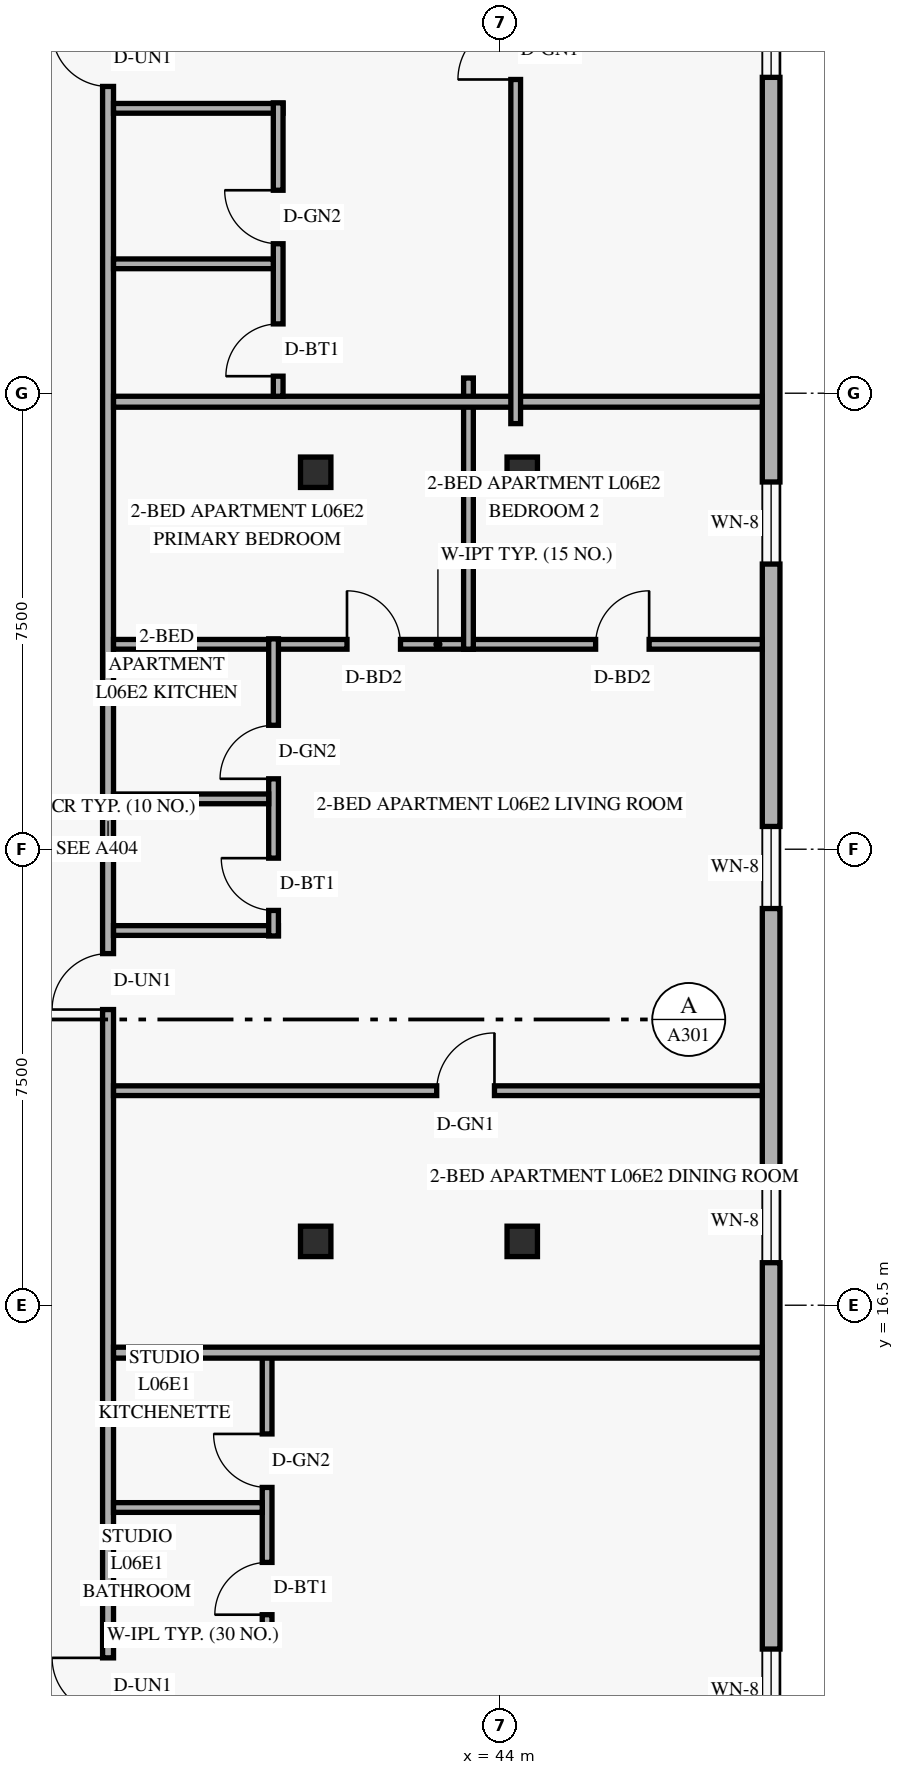
"""IFC4 building model, lengths in metres.
Left out: names, types, materials, properties, quantities, classifications, styles, units other than length and angle.
Written with IfcOpenShell. Run it as: python <this file> out.ifc"""

import sys

from ifc_helpers import new_model, si_unit, direction, frame, frame_2d, origin, origin_2d, place, context, subcontext, project, spatial, rectangle, hollow_rectangle, extrude, element, fill, save


model = new_model("IFC4")
c1 = context("Model", 3, precision=1e-05, world=origin(), true_north=direction((0.0, 1.0)))
c2 = subcontext(c1, "Body", "Model", "MODEL_VIEW")
j1 = project(units=[si_unit("LENGTHUNIT", "METRE"), si_unit("PLANEANGLEUNIT", "RADIAN")], contexts=[c1])
p1 = place(None, origin())
s1 = spatial("IfcSite", under=j1, at=p1, CompositionType="ELEMENT")
p2 = place(p1, origin())
s2 = spatial("IfcBuilding", under=s1, at=p2, CompositionType="ELEMENT")
p3 = place(p2, frame((0.0, 0.0, 27.6)))
s3 = spatial("IfcBuildingStorey", under=s2, at=p3, CompositionType="ELEMENT", Elevation=27.6)
for number, where, z_axis, x_axis in (
    (1, (40.902, 17.55, 0.0), (0.035, 0.0, 0.999), (0.0, 1.0, 0.0)),
    (2, (40.902, 30.2, 0.0), (0.035, 0.0, 0.999), (0.0, 1.0, 0.0)),
):
    element("IfcColumn", number, at=place(p3, frame(where, z_axis=z_axis, x_axis=x_axis)), inside=s3, PredefinedType="COLUMN", context=c2, shape_type="SweptSolid", body=[
        extrude(hollow_rectangle(XDim=0.5, YDim=0.5, WallThickness=0.022, at=origin_2d()), origin(), (0.0, 0.0, 1.0), 3.602),
    ])
for number, where, z_axis, x_axis in (
    (3, (44.258, 17.55, 0.0), (0.058, 0.0, 0.998), (0.0, 1.0, 0.0)),
    (4, (44.258, 30.2, 0.0), (0.058, 0.0, 0.998), (0.0, 1.0, 0.0)),
):
    element("IfcColumn", number, at=place(p3, frame(where, z_axis=z_axis, x_axis=x_axis)), inside=s3, PredefinedType="COLUMN", context=c2, shape_type="SweptSolid", body=[
        extrude(hollow_rectangle(XDim=0.5, YDim=0.5, WallThickness=0.022, at=origin_2d()), origin(), (0.0, 0.0, 1.0), 3.606),
    ])
p4 = place(p3, frame((48.455, 4.62, 0.0), z_axis=(0.0, 0.0, 1.0), x_axis=(0.0, 1.0, 0.0)))
e5 = element("IfcWall", 5, at=p4, inside=s3, PredefinedType="SOLIDWALL", context=c2, shape_type="SweptSolid", body=[
    extrude(rectangle(XDim=38.76, YDim=0.29, at=frame_2d((19.38, 0.0))), origin(), (0.0, 0.0, 1.0), 3.36),
])
p5 = place(p4, frame((4.875, 0.0, 0.85)))
e6 = element("IfcOpeningElement", 6, at=p5, cuts=e5, PredefinedType="OPENING", context=c2, shape_type="SweptSolid", body=[
    extrude(rectangle(XDim=1.35, YDim=1.55, at=frame_2d((0.675, 0.775))), frame((0.0, 0.155, 0.0), z_axis=(0.0, -1.0, 0.0), x_axis=(1.0, 0.0, 0.0)), (0.0, 0.0, 1.0), 0.31),
])
p6 = place(p4, frame((12.579, 0.0, 0.85)))
e7 = element("IfcOpeningElement", 7, at=p6, cuts=e5, PredefinedType="OPENING", context=c2, shape_type="SweptSolid", body=[
    extrude(rectangle(XDim=1.35, YDim=1.55, at=frame_2d((0.675, 0.775))), frame((0.0, 0.155, 0.0), z_axis=(0.0, -1.0, 0.0), x_axis=(1.0, 0.0, 0.0)), (0.0, 0.0, 1.0), 0.31),
])
p7 = place(p4, frame((18.404, 0.0, 0.85)))
e8 = element("IfcOpeningElement", 8, at=p7, cuts=e5, PredefinedType="OPENING", context=c2, shape_type="SweptSolid", body=[
    extrude(rectangle(XDim=1.35, YDim=1.55, at=frame_2d((0.675, 0.775))), frame((0.0, 0.155, 0.0), z_axis=(0.0, -1.0, 0.0), x_axis=(1.0, 0.0, 0.0)), (0.0, 0.0, 1.0), 0.31),
])
p8 = place(p4, frame((24.07, 0.0, 0.85)))
e9 = element("IfcOpeningElement", 9, at=p8, cuts=e5, PredefinedType="OPENING", context=c2, shape_type="SweptSolid", body=[
    extrude(rectangle(XDim=1.35, YDim=1.55, at=frame_2d((0.675, 0.775))), frame((0.0, 0.155, 0.0), z_axis=(0.0, -1.0, 0.0), x_axis=(1.0, 0.0, 0.0)), (0.0, 0.0, 1.0), 0.31),
])
p9 = place(p4, frame((32.075, 0.0, 0.85)))
e10 = element("IfcOpeningElement", 10, at=p9, cuts=e5, PredefinedType="OPENING", context=c2, shape_type="SweptSolid", body=[
    extrude(rectangle(XDim=1.35, YDim=1.55, at=frame_2d((0.675, 0.775))), frame((0.0, 0.155, 0.0), z_axis=(0.0, -1.0, 0.0), x_axis=(1.0, 0.0, 0.0)), (0.0, 0.0, 1.0), 0.31),
])
p10 = place(p3, frame((37.55, 1.29, 0.0), z_axis=(0.0, 0.0, 1.0), x_axis=(0.0, 1.0, 0.0)))
e11 = element("IfcWall", 11, at=p10, inside=s3, PredefinedType="STANDARD", context=c2, shape_type="SweptSolid", body=[
    extrude(rectangle(XDim=45.42, YDim=0.18, at=frame_2d((22.71, 0.0))), origin(), (0.0, 0.0, 1.0), 2.649),
])
p11 = place(p10, frame((8.49, 0.0, 0.0)))
e12 = element("IfcOpeningElement", 12, at=p11, cuts=e11, PredefinedType="OPENING", context=c2, shape_type="SweptSolid", body=[
    extrude(rectangle(XDim=0.92, YDim=2.15, at=frame_2d((0.46, 1.075))), frame((0.0, 0.1, 0.0), z_axis=(0.0, -1.0, 0.0), x_axis=(1.0, 0.0, 0.0)), (0.0, 0.0, 1.0), 0.2),
])
p12 = place(p10, frame((20.073, 0.0, 0.0)))
e13 = element("IfcOpeningElement", 13, at=p12, cuts=e11, PredefinedType="OPENING", context=c2, shape_type="SweptSolid", body=[
    extrude(rectangle(XDim=0.92, YDim=2.15, at=frame_2d((0.46, 1.075))), frame((0.0, 0.1, 0.0), z_axis=(0.0, -1.0, 0.0), x_axis=(1.0, 0.0, 0.0)), (0.0, 0.0, 1.0), 0.2),
])
p13 = place(p10, frame((35.256, 0.0, 0.0)))
e14 = element("IfcOpeningElement", 14, at=p13, cuts=e11, PredefinedType="OPENING", context=c2, shape_type="SweptSolid", body=[
    extrude(rectangle(XDim=0.92, YDim=2.15, at=frame_2d((0.46, 1.075))), frame((0.0, 0.1, 0.0), z_axis=(0.0, -1.0, 0.0), x_axis=(1.0, 0.0, 0.0)), (0.0, 0.0, 1.0), 0.2),
])
p14 = place(p3, frame((37.64, 11.08, 0.0), z_axis=(0.0, 0.0, 1.0), x_axis=(1.0, 0.0, 0.0)))
e15 = element("IfcWall", 15, at=p14, inside=s3, PredefinedType="PLUMBINGWALL", context=c2, shape_type="SweptSolid", body=[
    extrude(rectangle(XDim=2.606, YDim=0.16, at=frame_2d((1.303, 0.0))), origin(), (0.0, 0.0, 1.0), 3.36),
])
p15 = place(p3, frame((40.166, 10.99, 0.0), z_axis=(0.0, 0.0, 1.0), x_axis=(0.0, 1.0, 0.0)))
e16 = element("IfcWall", 16, at=p15, inside=s3, PredefinedType="PLUMBINGWALL", context=c2, shape_type="SweptSolid", body=[
    extrude(rectangle(XDim=4.73, YDim=0.16, at=frame_2d((2.365, 0.0))), origin(), (0.0, 0.0, 1.0), 2.932),
])
p16 = place(p15, frame((0.42, 0.0, 0.0)))
e17 = element("IfcOpeningElement", 17, at=p16, cuts=e16, PredefinedType="OPENING", context=c2, shape_type="SweptSolid", body=[
    extrude(rectangle(XDim=0.86, YDim=2.12, at=frame_2d((0.43, 1.06))), frame((0.0, 0.09, 0.0), z_axis=(0.0, -1.0, 0.0), x_axis=(1.0, 0.0, 0.0)), (0.0, 0.0, 1.0), 0.18),
])
p17 = place(p15, frame((2.513, 0.0, 0.0)))
e18 = element("IfcOpeningElement", 18, at=p17, cuts=e16, PredefinedType="OPENING", context=c2, shape_type="SweptSolid", body=[
    extrude(rectangle(XDim=0.88, YDim=2.12, at=frame_2d((0.44, 1.06))), frame((0.0, 0.09, 0.0), z_axis=(0.0, -1.0, 0.0), x_axis=(1.0, 0.0, 0.0)), (0.0, 0.0, 1.0), 0.18),
])
p18 = place(p3, frame((37.64, 13.173, 0.0), z_axis=(0.0, 0.0, 1.0), x_axis=(1.0, 0.0, 0.0)))
e19 = element("IfcWall", 19, at=p18, inside=s3, PredefinedType="PLUMBINGWALL", context=c2, shape_type="SweptSolid", body=[
    extrude(rectangle(XDim=2.446, YDim=0.16, at=frame_2d((1.223, 0.0))), origin(), (0.0, 0.0, 1.0), 3.36),
])
p19 = place(p3, frame((37.64, 15.72, 0.0), z_axis=(0.0, 0.0, 1.0), x_axis=(1.0, 0.0, 0.0)))
e20 = element("IfcWall", 20, at=p19, inside=s3, PredefinedType="PARTITIONING", context=c2, shape_type="SweptSolid", body=[
    extrude(rectangle(XDim=10.67, YDim=0.18, at=frame_2d((5.335, 0.0))), origin(), (0.0, 0.0, 1.0), 2.649),
])
p20 = place(p3, frame((37.64, 27.37, 0.0), z_axis=(0.0, 0.0, 1.0), x_axis=(1.0, 0.0, 0.0)))
e21 = element("IfcWall", 21, at=p20, inside=s3, PredefinedType="PARTITIONING", context=c2, shape_type="SweptSolid", body=[
    extrude(rectangle(XDim=10.67, YDim=0.16, at=frame_2d((5.335, 0.0))), origin(), (0.0, 0.0, 1.0), 2.649),
])
p21 = place(p20, frame((3.84, 0.0, 0.0)))
e22 = element("IfcOpeningElement", 22, at=p21, cuts=e21, PredefinedType="OPENING", context=c2, shape_type="SweptSolid", body=[
    extrude(rectangle(XDim=0.88, YDim=2.14, at=frame_2d((0.44, 1.07))), frame((0.0, 0.09, 0.0), z_axis=(0.0, -1.0, 0.0), x_axis=(1.0, 0.0, 0.0)), (0.0, 0.0, 1.0), 0.18),
])
p22 = place(p20, frame((7.929, 0.0, 0.0)))
e23 = element("IfcOpeningElement", 23, at=p22, cuts=e21, PredefinedType="OPENING", context=c2, shape_type="SweptSolid", body=[
    extrude(rectangle(XDim=0.88, YDim=2.14, at=frame_2d((0.44, 1.07))), frame((0.0, 0.09, 0.0), z_axis=(0.0, -1.0, 0.0), x_axis=(1.0, 0.0, 0.0)), (0.0, 0.0, 1.0), 0.18),
])
p23 = place(p3, frame((37.64, 22.663, 0.0), z_axis=(0.0, 0.0, 1.0), x_axis=(1.0, 0.0, 0.0)))
e24 = element("IfcWall", 24, at=p23, inside=s3, PredefinedType="PLUMBINGWALL", context=c2, shape_type="SweptSolid", body=[
    extrude(rectangle(XDim=2.712, YDim=0.16, at=frame_2d((1.356, 0.0))), origin(), (0.0, 0.0, 1.0), 3.36),
])
p24 = place(p3, frame((40.272, 22.573, 0.0), z_axis=(0.0, 0.0, 1.0), x_axis=(0.0, 1.0, 0.0)))
e25 = element("IfcWall", 25, at=p24, inside=s3, PredefinedType="PLUMBINGWALL", context=c2, shape_type="SweptSolid", body=[
    extrude(rectangle(XDim=4.887, YDim=0.16, at=frame_2d((2.443, 0.0))), origin(), (0.0, 0.0, 1.0), 2.932),
])
p25 = place(p24, frame((0.42, 0.0, 0.0)))
e26 = element("IfcOpeningElement", 26, at=p25, cuts=e25, PredefinedType="OPENING", context=c2, shape_type="SweptSolid", body=[
    extrude(rectangle(XDim=0.86, YDim=2.12, at=frame_2d((0.43, 1.06))), frame((0.0, 0.09, 0.0), z_axis=(0.0, -1.0, 0.0), x_axis=(1.0, 0.0, 0.0)), (0.0, 0.0, 1.0), 0.18),
])
p26 = place(p24, frame((2.585, 0.0, 0.0)))
e27 = element("IfcOpeningElement", 27, at=p26, cuts=e25, PredefinedType="OPENING", context=c2, shape_type="SweptSolid", body=[
    extrude(rectangle(XDim=0.88, YDim=2.12, at=frame_2d((0.44, 1.06))), frame((0.0, 0.09, 0.0), z_axis=(0.0, -1.0, 0.0), x_axis=(1.0, 0.0, 0.0)), (0.0, 0.0, 1.0), 0.18),
])
p27 = place(p3, frame((37.64, 24.828, 0.0), z_axis=(0.0, 0.0, 1.0), x_axis=(1.0, 0.0, 0.0)))
e28 = element("IfcWall", 28, at=p27, inside=s3, PredefinedType="PLUMBINGWALL", context=c2, shape_type="SweptSolid", body=[
    extrude(rectangle(XDim=2.552, YDim=0.16, at=frame_2d((1.276, 0.0))), origin(), (0.0, 0.0, 1.0), 3.36),
])
p28 = place(p3, frame((37.64, 20.029, 0.0), z_axis=(0.0, 0.0, 1.0), x_axis=(1.0, 0.0, 0.0)))
e29 = element("IfcWall", 29, at=p28, inside=s3, PredefinedType="PARTITIONING", context=c2, shape_type="SweptSolid", body=[
    extrude(rectangle(XDim=10.67, YDim=0.16, at=frame_2d((5.335, 0.0))), origin(), (0.0, 0.0, 1.0), 2.649),
])
p29 = place(p28, frame((5.315, 0.0, 0.0)))
e30 = element("IfcOpeningElement", 30, at=p29, cuts=e29, PredefinedType="OPENING", context=c2, shape_type="SweptSolid", body=[
    extrude(rectangle(XDim=0.95, YDim=2.15, at=frame_2d((0.475, 1.075))), frame((0.0, 0.09, 0.0), z_axis=(0.0, -1.0, 0.0), x_axis=(1.0, 0.0, 0.0)), (0.0, 0.0, 1.0), 0.18),
])
p30 = place(p3, frame((43.477, 27.29, 0.0), z_axis=(0.0, 0.0, 1.0), x_axis=(0.0, 1.0, 0.0)))
e31 = element("IfcWall", 31, at=p30, inside=s3, PredefinedType="PARTITIONING", context=c2, shape_type="SweptSolid", body=[
    extrude(rectangle(XDim=4.46, YDim=0.16, at=frame_2d((2.23, 0.0))), origin(), (0.0, 0.0, 1.0), 2.649),
])
p31 = place(p3, frame((37.64, 31.36, 0.0), z_axis=(0.0, 0.0, 1.0), x_axis=(1.0, 0.0, 0.0)))
e32 = element("IfcWall", 32, at=p31, inside=s3, PredefinedType="PARTITIONING", context=c2, shape_type="SweptSolid", body=[
    extrude(rectangle(XDim=10.67, YDim=0.18, at=frame_2d((5.335, 0.0))), origin(), (0.0, 0.0, 1.0), 2.649),
])
p32 = place(p3, frame((37.64, 36.186, 0.0), z_axis=(0.0, 0.0, 1.0), x_axis=(1.0, 0.0, 0.0)))
e33 = element("IfcWall", 33, at=p32, inside=s3, PredefinedType="PLUMBINGWALL", context=c2, shape_type="SweptSolid", body=[
    extrude(rectangle(XDim=2.788, YDim=0.16, at=frame_2d((1.394, 0.0))), origin(), (0.0, 0.0, 1.0), 3.36),
])
p33 = place(p3, frame((40.348, 31.45, 0.0), z_axis=(0.0, 0.0, 1.0), x_axis=(0.0, 1.0, 0.0)))
e34 = element("IfcWall", 34, at=p33, inside=s3, PredefinedType="PLUMBINGWALL", context=c2, shape_type="SweptSolid", body=[
    extrude(rectangle(XDim=4.825, YDim=0.16, at=frame_2d((2.413, 0.0))), origin(), (0.0, 0.0, 1.0), 2.932),
])
p34 = place(p33, frame((0.33, 0.0, 0.0)))
e35 = element("IfcOpeningElement", 35, at=p34, cuts=e34, PredefinedType="OPENING", context=c2, shape_type="SweptSolid", body=[
    extrude(rectangle(XDim=0.86, YDim=2.12, at=frame_2d((0.43, 1.06))), frame((0.0, 0.09, 0.0), z_axis=(0.0, -1.0, 0.0), x_axis=(1.0, 0.0, 0.0)), (0.0, 0.0, 1.0), 0.18),
])
p35 = place(p33, frame((2.508, 0.0, 0.0)))
e36 = element("IfcOpeningElement", 36, at=p35, cuts=e34, PredefinedType="OPENING", context=c2, shape_type="SweptSolid", body=[
    extrude(rectangle(XDim=0.88, YDim=2.12, at=frame_2d((0.44, 1.06))), frame((0.0, 0.09, 0.0), z_axis=(0.0, -1.0, 0.0), x_axis=(1.0, 0.0, 0.0)), (0.0, 0.0, 1.0), 0.18),
])
p36 = place(p3, frame((37.64, 33.628, 0.0), z_axis=(0.0, 0.0, 1.0), x_axis=(1.0, 0.0, 0.0)))
e37 = element("IfcWall", 37, at=p36, inside=s3, PredefinedType="PLUMBINGWALL", context=c2, shape_type="SweptSolid", body=[
    extrude(rectangle(XDim=2.628, YDim=0.16, at=frame_2d((1.314, 0.0))), origin(), (0.0, 0.0, 1.0), 3.36),
])
p37 = place(p3, frame((44.254, 31.0, 0.0), z_axis=(0.0, 0.0, 1.0), x_axis=(0.0, 1.0, 0.0)))
e38 = element("IfcWall", 38, at=p37, inside=s3, PredefinedType="PARTITIONING", context=c2, shape_type="SweptSolid", body=[
    extrude(rectangle(XDim=12.84, YDim=0.16, at=frame_2d((6.42, 0.0))), origin(), (0.0, 0.0, 1.0), 2.649),
])
p38 = place(p37, frame((5.66, 0.0, 0.0)))
e39 = element("IfcOpeningElement", 39, at=p38, cuts=e38, PredefinedType="OPENING", context=c2, shape_type="SweptSolid", body=[
    extrude(rectangle(XDim=0.95, YDim=2.15, at=frame_2d((0.475, 1.075))), frame((0.0, 0.09, 0.0), z_axis=(0.0, -1.0, 0.0), x_axis=(1.0, 0.0, 0.0)), (0.0, 0.0, 1.0), 0.18),
])
p39 = place(p5, origin())
e40 = element("IfcWindow", 40, at=p39, inside=s3, PartitioningType="SINGLE_PANEL", PredefinedType="WINDOW", context=c2, shape_type="SweptSolid", body=[
    extrude(rectangle(XDim=1.35, YDim=1.55, at=frame_2d((0.675, 0.775))), frame((0.0, 0.03, 0.0), z_axis=(0.0, -1.0, 0.0), x_axis=(1.0, 0.0, 0.0)), (0.0, 0.0, 1.0), 0.06),
])
fill(e6, e40)
p40 = place(p6, origin())
e41 = element("IfcWindow", 41, at=p40, inside=s3, PartitioningType="SINGLE_PANEL", PredefinedType="WINDOW", context=c2, shape_type="SweptSolid", body=[
    extrude(rectangle(XDim=1.35, YDim=1.55, at=frame_2d((0.675, 0.775))), frame((0.0, 0.03, 0.0), z_axis=(0.0, -1.0, 0.0), x_axis=(1.0, 0.0, 0.0)), (0.0, 0.0, 1.0), 0.06),
])
fill(e7, e41)
p41 = place(p7, origin())
e42 = element("IfcWindow", 42, at=p41, inside=s3, PartitioningType="SINGLE_PANEL", PredefinedType="WINDOW", context=c2, shape_type="SweptSolid", body=[
    extrude(rectangle(XDim=1.35, YDim=1.55, at=frame_2d((0.675, 0.775))), frame((0.0, 0.03, 0.0), z_axis=(0.0, -1.0, 0.0), x_axis=(1.0, 0.0, 0.0)), (0.0, 0.0, 1.0), 0.06),
])
fill(e8, e42)
p42 = place(p8, origin())
e43 = element("IfcWindow", 43, at=p42, inside=s3, PartitioningType="SINGLE_PANEL", PredefinedType="WINDOW", context=c2, shape_type="SweptSolid", body=[
    extrude(rectangle(XDim=1.35, YDim=1.55, at=frame_2d((0.675, 0.775))), frame((0.0, 0.03, 0.0), z_axis=(0.0, -1.0, 0.0), x_axis=(1.0, 0.0, 0.0)), (0.0, 0.0, 1.0), 0.06),
])
fill(e9, e43)
p43 = place(p9, origin())
e44 = element("IfcWindow", 44, at=p43, inside=s3, PartitioningType="SINGLE_PANEL", PredefinedType="WINDOW", context=c2, shape_type="SweptSolid", body=[
    extrude(rectangle(XDim=1.35, YDim=1.55, at=frame_2d((0.675, 0.775))), frame((0.0, 0.03, 0.0), z_axis=(0.0, -1.0, 0.0), x_axis=(1.0, 0.0, 0.0)), (0.0, 0.0, 1.0), 0.06),
])
fill(e10, e44)
p44 = place(p11, origin())
e45 = element("IfcDoor", 45, at=p44, inside=s3, OperationType="SINGLE_SWING_RIGHT", PredefinedType="DOOR", context=c2, shape_type="SweptSolid", body=[
    extrude(rectangle(XDim=0.92, YDim=2.15, at=frame_2d((0.46, 1.075))), frame((0.0, 0.025, 0.0), z_axis=(0.0, -1.0, 0.0), x_axis=(1.0, 0.0, 0.0)), (0.0, 0.0, 1.0), 0.05),
])
fill(e12, e45)
p45 = place(p16, origin())
e46 = element("IfcDoor", 46, at=p45, inside=s3, OperationType="SINGLE_SWING_LEFT", PredefinedType="DOOR", context=c2, shape_type="SweptSolid", body=[
    extrude(rectangle(XDim=0.86, YDim=2.12, at=frame_2d((0.43, 1.06))), frame((0.0, 0.025, 0.0), z_axis=(0.0, -1.0, 0.0), x_axis=(1.0, 0.0, 0.0)), (0.0, 0.0, 1.0), 0.05),
])
fill(e17, e46)
p46 = place(p17, origin())
e47 = element("IfcDoor", 47, at=p46, inside=s3, OperationType="SINGLE_SWING_RIGHT", PredefinedType="DOOR", context=c2, shape_type="SweptSolid", body=[
    extrude(rectangle(XDim=0.88, YDim=2.12, at=frame_2d((0.44, 1.06))), frame((0.0, 0.025, 0.0), z_axis=(0.0, -1.0, 0.0), x_axis=(1.0, 0.0, 0.0)), (0.0, 0.0, 1.0), 0.05),
])
fill(e18, e47)
p47 = place(p29, origin())
e48 = element("IfcDoor", 48, at=p47, inside=s3, OperationType="SINGLE_SWING_RIGHT", PredefinedType="DOOR", context=c2, shape_type="SweptSolid", body=[
    extrude(rectangle(XDim=0.95, YDim=2.15, at=frame_2d((0.475, 1.075))), frame((0.0, 0.025, 0.0), z_axis=(0.0, -1.0, 0.0), x_axis=(1.0, 0.0, 0.0)), (0.0, 0.0, 1.0), 0.05),
])
fill(e30, e48)
p48 = place(p12, origin())
e49 = element("IfcDoor", 49, at=p48, inside=s3, OperationType="SINGLE_SWING_LEFT", PredefinedType="DOOR", context=c2, shape_type="SweptSolid", body=[
    extrude(rectangle(XDim=0.92, YDim=2.15, at=frame_2d((0.46, 1.075))), frame((0.0, 0.025, 0.0), z_axis=(0.0, -1.0, 0.0), x_axis=(1.0, 0.0, 0.0)), (0.0, 0.0, 1.0), 0.05),
])
fill(e13, e49)
p49 = place(p25, origin())
e50 = element("IfcDoor", 50, at=p49, inside=s3, OperationType="SINGLE_SWING_RIGHT", PredefinedType="DOOR", context=c2, shape_type="SweptSolid", body=[
    extrude(rectangle(XDim=0.86, YDim=2.12, at=frame_2d((0.43, 1.06))), frame((0.0, 0.025, 0.0), z_axis=(0.0, -1.0, 0.0), x_axis=(1.0, 0.0, 0.0)), (0.0, 0.0, 1.0), 0.05),
])
fill(e26, e50)
p50 = place(p26, origin())
e51 = element("IfcDoor", 51, at=p50, inside=s3, OperationType="SINGLE_SWING_LEFT", PredefinedType="DOOR", context=c2, shape_type="SweptSolid", body=[
    extrude(rectangle(XDim=0.88, YDim=2.12, at=frame_2d((0.44, 1.06))), frame((0.0, 0.025, 0.0), z_axis=(0.0, -1.0, 0.0), x_axis=(1.0, 0.0, 0.0)), (0.0, 0.0, 1.0), 0.05),
])
fill(e27, e51)
p51 = place(p21, origin())
e52 = element("IfcDoor", 52, at=p51, inside=s3, OperationType="SINGLE_SWING_LEFT", PredefinedType="DOOR", context=c2, shape_type="SweptSolid", body=[
    extrude(rectangle(XDim=0.88, YDim=2.14, at=frame_2d((0.44, 1.07))), frame((0.0, 0.025, 0.0), z_axis=(0.0, -1.0, 0.0), x_axis=(1.0, 0.0, 0.0)), (0.0, 0.0, 1.0), 0.05),
])
fill(e22, e52)
p52 = place(p22, origin())
e53 = element("IfcDoor", 53, at=p52, inside=s3, OperationType="SINGLE_SWING_RIGHT", PredefinedType="DOOR", context=c2, shape_type="SweptSolid", body=[
    extrude(rectangle(XDim=0.88, YDim=2.14, at=frame_2d((0.44, 1.07))), frame((0.0, 0.025, 0.0), z_axis=(0.0, -1.0, 0.0), x_axis=(1.0, 0.0, 0.0)), (0.0, 0.0, 1.0), 0.05),
])
fill(e23, e53)
p53 = place(p38, origin())
e54 = element("IfcDoor", 54, at=p53, inside=s3, OperationType="SINGLE_SWING_LEFT", PredefinedType="DOOR", context=c2, shape_type="SweptSolid", body=[
    extrude(rectangle(XDim=0.95, YDim=2.15, at=frame_2d((0.475, 1.075))), frame((0.0, 0.025, 0.0), z_axis=(0.0, -1.0, 0.0), x_axis=(1.0, 0.0, 0.0)), (0.0, 0.0, 1.0), 0.05),
])
fill(e39, e54)
p54 = place(p13, origin())
e55 = element("IfcDoor", 55, at=p54, inside=s3, OperationType="SINGLE_SWING_RIGHT", PredefinedType="DOOR", context=c2, shape_type="SweptSolid", body=[
    extrude(rectangle(XDim=0.92, YDim=2.15, at=frame_2d((0.46, 1.075))), frame((0.0, 0.025, 0.0), z_axis=(0.0, -1.0, 0.0), x_axis=(1.0, 0.0, 0.0)), (0.0, 0.0, 1.0), 0.05),
])
fill(e14, e55)
p55 = place(p34, origin())
e56 = element("IfcDoor", 56, at=p55, inside=s3, OperationType="SINGLE_SWING_LEFT", PredefinedType="DOOR", context=c2, shape_type="SweptSolid", body=[
    extrude(rectangle(XDim=0.86, YDim=2.12, at=frame_2d((0.43, 1.06))), frame((0.0, 0.025, 0.0), z_axis=(0.0, -1.0, 0.0), x_axis=(1.0, 0.0, 0.0)), (0.0, 0.0, 1.0), 0.05),
])
fill(e35, e56)
p56 = place(p35, origin())
e57 = element("IfcDoor", 57, at=p56, inside=s3, OperationType="SINGLE_SWING_RIGHT", PredefinedType="DOOR", context=c2, shape_type="SweptSolid", body=[
    extrude(rectangle(XDim=0.88, YDim=2.12, at=frame_2d((0.44, 1.06))), frame((0.0, 0.025, 0.0), z_axis=(0.0, -1.0, 0.0), x_axis=(1.0, 0.0, 0.0)), (0.0, 0.0, 1.0), 0.05),
])
fill(e36, e57)
save(model, sys.argv[1])
